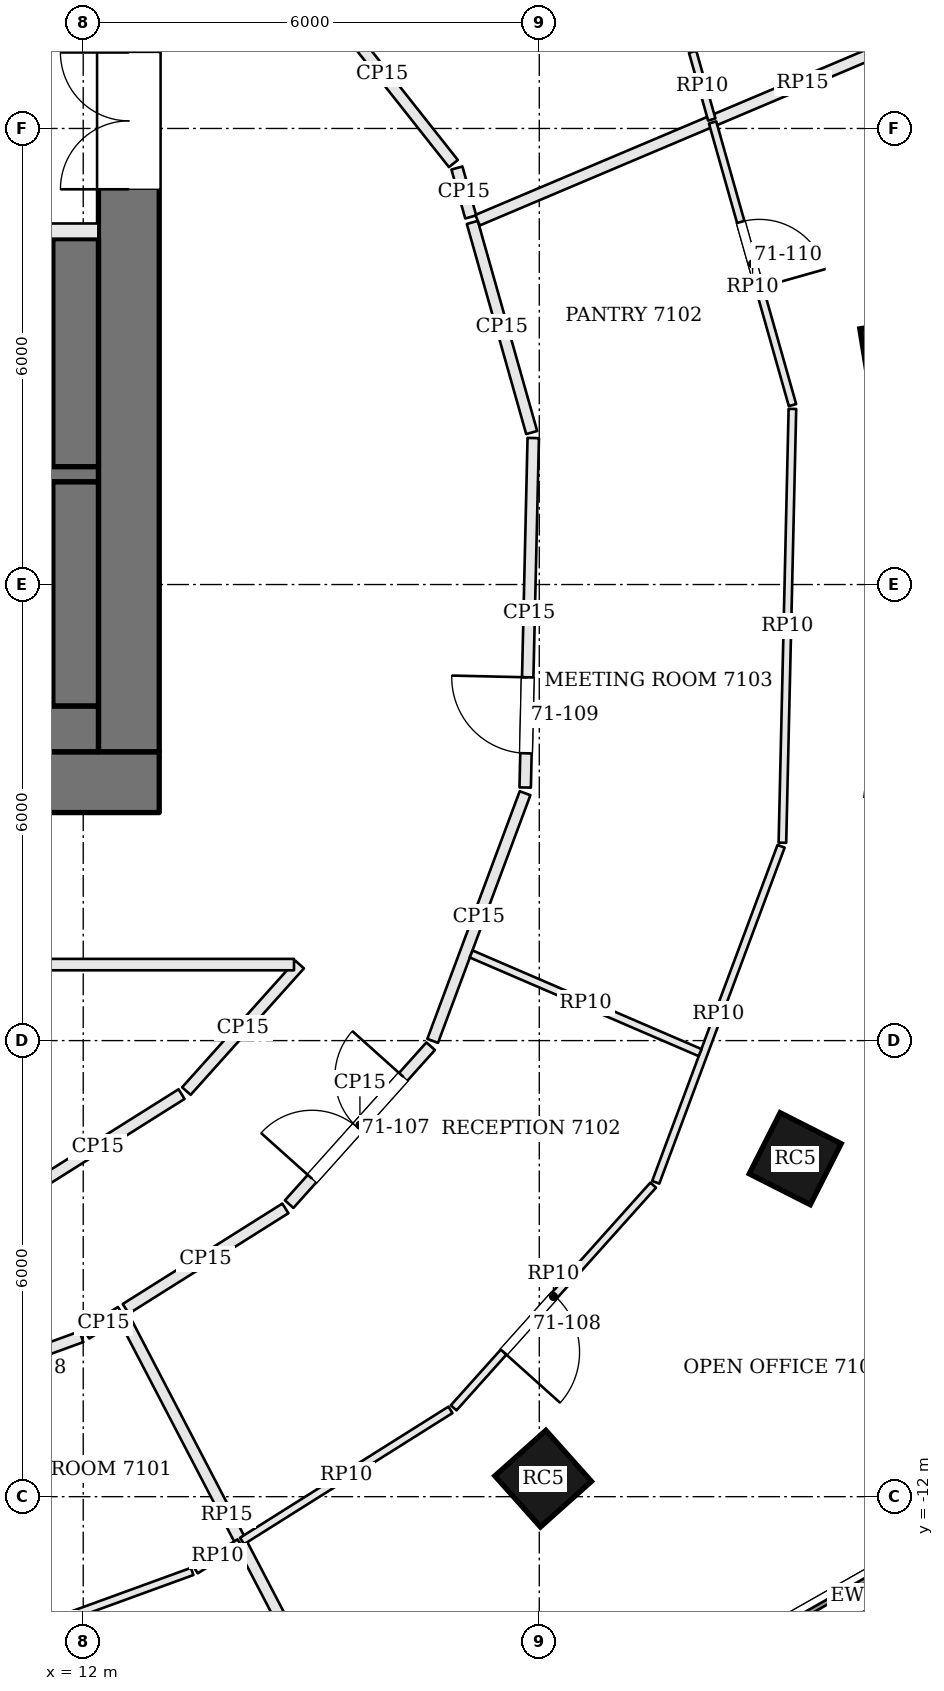
"""IFC4 building model, lengths in metres.
Left out: names, types, materials, properties, quantities, classifications, styles, units other than length and angle.
Written with IfcOpenShell. Run it as: python <this file> out.ifc"""

import sys

from ifc_helpers import new_model, si_unit, direction, frame, frame_2d, origin, origin_2d, place, context, subcontext, project, spatial, rectangle, extrude, element, fill, save


model = new_model("IFC4")
c1 = context("Model", 3, precision=1e-05, world=origin(), true_north=direction((0.0, 1.0)))
c2 = subcontext(c1, "Body", "Model", "MODEL_VIEW")
j1 = project(units=[si_unit("LENGTHUNIT", "METRE"), si_unit("PLANEANGLEUNIT", "RADIAN")], contexts=[c1])
p1 = place(None, origin())
s1 = spatial("IfcSite", under=j1, at=p1, CompositionType="ELEMENT")
p2 = place(p1, origin())
s2 = spatial("IfcBuilding", under=s1, at=p2, CompositionType="ELEMENT")
p3 = place(p2, frame((0.0, 0.0, 288.3)))
s3 = spatial("IfcBuildingStorey", under=s2, at=p3, CompositionType="ELEMENT", Elevation=288.3)
p4 = place(p3, frame((-13.0, -2.6, 0.0), z_axis=(0.0, 0.0, 1.0), x_axis=(1.0, 0.0, 0.0)))
e1 = element("IfcWall", 1, at=p4, inside=s3, PredefinedType="SHEAR", context=c2, shape_type="SweptSolid", body=[
    extrude(rectangle(XDim=26.0, YDim=0.8, at=frame_2d((13.0, 0.0))), origin(), (0.0, 0.0, 1.0), 3.9),
])
p5 = place(p4, frame((9.275, 0.0, 0.0)))
e2 = element("IfcOpeningElement", 2, at=p5, cuts=e1, PredefinedType="OPENING", context=c2, shape_type="SweptSolid", body=[
    extrude(rectangle(XDim=0.9, YDim=2.1, at=frame_2d((0.45, 1.05))), frame((0.0, 0.41, 0.0), z_axis=(0.0, -1.0, 0.0), x_axis=(1.0, 0.0, 0.0)), (0.0, 0.0, 1.0), 0.82),
])
p6 = place(p4, frame((11.75, 0.0, 0.0)))
e3 = element("IfcOpeningElement", 3, at=p6, cuts=e1, PredefinedType="OPENING", context=c2, shape_type="SweptSolid", body=[
    extrude(rectangle(XDim=1.0, YDim=2.1, at=frame_2d((0.5, 1.05))), frame((0.0, 0.41, 0.0), z_axis=(0.0, -1.0, 0.0), x_axis=(1.0, 0.0, 0.0)), (0.0, 0.0, 1.0), 0.82),
])
p7 = place(p4, frame((14.325, 0.0, 0.0)))
e4 = element("IfcOpeningElement", 4, at=p7, cuts=e1, PredefinedType="OPENING", context=c2, shape_type="SweptSolid", body=[
    extrude(rectangle(XDim=0.9, YDim=2.1, at=frame_2d((0.45, 1.05))), frame((0.0, 0.41, 0.0), z_axis=(0.0, -1.0, 0.0), x_axis=(1.0, 0.0, 0.0)), (0.0, 0.0, 1.0), 0.82),
])
p8 = place(p4, frame((16.7, 0.0, 0.0)))
e5 = element("IfcOpeningElement", 5, at=p8, cuts=e1, PredefinedType="OPENING", context=c2, shape_type="SweptSolid", body=[
    extrude(rectangle(XDim=0.9, YDim=2.1, at=frame_2d((0.45, 1.05))), frame((0.0, 0.41, 0.0), z_axis=(0.0, -1.0, 0.0), x_axis=(1.0, 0.0, 0.0)), (0.0, 0.0, 1.0), 0.82),
])
p9 = place(p3, frame((12.6, -2.2, 0.0), z_axis=(0.0, 0.0, 1.0), x_axis=(0.0, 1.0, 0.0)))
e6 = element("IfcWall", 6, at=p9, inside=s3, PredefinedType="SHEAR", context=c2, shape_type="SweptSolid", body=[
    extrude(rectangle(XDim=13.4, YDim=0.8, at=frame_2d((6.7, 0.0))), origin(), (0.0, 0.0, 1.0), 3.9),
])
p10 = place(p9, frame((7.4, 0.0, 0.0)))
e7 = element("IfcOpeningElement", 7, at=p10, cuts=e6, PredefinedType="OPENING", context=c2, shape_type="SweptSolid", body=[
    extrude(rectangle(XDim=1.8, YDim=2.1, at=frame_2d((0.9, 1.05))), frame((0.0, 0.41, 0.0), z_axis=(0.0, -1.0, 0.0), x_axis=(1.0, 0.0, 0.0)), (0.0, 0.0, 1.0), 0.82),
])
for number, where, z_axis, x_axis in (
    (8, (22.734, 2.993, 0.0), (0.0, 0.0, 1.0), (-0.162, 0.987, 0.0)),
    (9, (18.051, -11.763, 0.0), (0.0, 0.0, 1.0), (0.746, 0.666, 0.0)),
    (10, (21.367, -7.554, 0.0), (0.0, 0.0, 1.0), (0.452, 0.892, 0.0)),
):
    element("IfcColumn", number, at=place(p3, frame(where, z_axis=z_axis, x_axis=x_axis)), inside=s3, PredefinedType="COLUMN", context=c2, shape_type="SweptSolid", body=[
        extrude(rectangle(XDim=0.9, YDim=0.9, at=origin_2d()), origin(), (0.0, 0.0, 1.0), 3.9),
    ])
p11 = place(p3, frame((20.115, -14.455, 0.0), z_axis=(0.0, 0.0, 1.0), x_axis=(0.869822679286, 0.493364476427, 0.0)))
e11 = element("IfcWall", 11, at=p11, inside=s3, PredefinedType="SOLIDWALL", context=c2, shape_type="SweptSolid", body=[
    extrude(rectangle(XDim=4.638, YDim=0.45, at=frame_2d((2.319, 0.0))), origin(), (0.0, 0.0, 1.0), 3.7),
])
p12 = place(p11, frame((1.269, 0.0, 0.9)))
e12 = element("IfcOpeningElement", 12, at=p12, cuts=e11, PredefinedType="OPENING", context=c2, shape_type="SweptSolid", body=[
    extrude(rectangle(XDim=2.1, YDim=2.3, at=frame_2d((1.05, 1.15))), frame((0.0, 0.235, 0.0), z_axis=(0.0, -1.0, 0.0), x_axis=(1.0, 0.0, 0.0)), (0.0, 0.0, 1.0), 0.47),
])
p13 = place(p3, frame((12.2, 4.65, 0.0), z_axis=(0.0, 0.0, 1.0), x_axis=(-1.0, 0.0, 0.0)))
e13 = element("IfcWall", 13, at=p13, inside=s3, PredefinedType="SOLIDWALL", context=c2, shape_type="SweptSolid", body=[
    extrude(rectangle(XDim=7.1, YDim=0.2, at=frame_2d((3.55, 0.0))), origin(), (0.0, 0.0, 1.0), 3.7),
])
p14 = place(p13, frame((4.4, 0.0, 0.0)))
e14 = element("IfcOpeningElement", 14, at=p14, cuts=e13, PredefinedType="OPENING", context=c2, shape_type="SweptSolid", body=[
    extrude(rectangle(XDim=1.2, YDim=2.1, at=frame_2d((0.6, 1.05))), frame((0.0, 0.11, 0.0), z_axis=(0.0, -1.0, 0.0), x_axis=(1.0, 0.0, 0.0)), (0.0, 0.0, 1.0), 0.22),
])
p15 = place(p13, frame((1.1, 0.0, 0.0)))
e15 = element("IfcOpeningElement", 15, at=p15, cuts=e13, PredefinedType="OPENING", context=c2, shape_type="SweptSolid", body=[
    extrude(rectangle(XDim=1.2, YDim=2.1, at=frame_2d((0.6, 1.05))), frame((0.0, 0.11, 0.0), z_axis=(0.0, -1.0, 0.0), x_axis=(1.0, 0.0, 0.0)), (0.0, 0.0, 1.0), 0.22),
])
p16 = place(p3, frame((12.2, 1.475, 0.0), z_axis=(0.0, 0.0, 1.0), x_axis=(-1.0, 0.0, 0.0)))
e16 = element("IfcWall", 16, at=p16, inside=s3, PredefinedType="SOLIDWALL", context=c2, shape_type="SweptSolid", body=[
    extrude(rectangle(XDim=7.1, YDim=0.25, at=frame_2d((3.55, 0.0))), origin(), (0.0, 0.0, 1.0), 3.7),
])
p17 = place(p16, frame((5.8, 0.0, 0.0)))
e17 = element("IfcOpeningElement", 17, at=p17, cuts=e16, PredefinedType="OPENING", context=c2, shape_type="SweptSolid", body=[
    extrude(rectangle(XDim=1.2, YDim=2.1, at=frame_2d((0.6, 1.05))), frame((0.0, 0.135, 0.0), z_axis=(0.0, -1.0, 0.0), x_axis=(1.0, 0.0, 0.0)), (0.0, 0.0, 1.0), 0.27),
])
p18 = place(p3, frame((11.9, 4.55, 0.0), z_axis=(0.0, 0.0, 1.0), x_axis=(0.0, -1.0, 0.0)))
e18 = element("IfcWall", 18, at=p18, inside=s3, PredefinedType="SOLIDWALL", context=c2, shape_type="SweptSolid", body=[
    extrude(rectangle(XDim=3.0, YDim=0.6, at=frame_2d((1.5, 0.0))), origin(), (0.0, 0.0, 1.0), 3.7),
])
p19 = place(p3, frame((11.9, 1.35, 0.0), z_axis=(0.0, 0.0, 1.0), x_axis=(0.0, -1.0, 0.0)))
e19 = element("IfcWall", 19, at=p19, inside=s3, PredefinedType="SOLIDWALL", context=c2, shape_type="SweptSolid", body=[
    extrude(rectangle(XDim=2.95, YDim=0.6, at=frame_2d((1.475, 0.0))), origin(), (0.0, 0.0, 1.0), 3.7),
])
p20 = place(p3, frame((12.2, -1.9, 0.0), z_axis=(0.0, 0.0, 1.0), x_axis=(-1.0, 0.0, 0.0)))
e20 = element("IfcWall", 20, at=p20, inside=s3, PredefinedType="SOLIDWALL", context=c2, shape_type="SweptSolid", body=[
    extrude(rectangle(XDim=7.1, YDim=0.6, at=frame_2d((3.55, 0.0))), origin(), (0.0, 0.0, 1.0), 3.7),
])
p21 = place(p3, frame((8.86, -11.03, 0.0), z_axis=(0.0, 0.0, 1.0), x_axis=(0.939685902536, 0.342038601001, 0.0)))
e21 = element("IfcWall", 21, at=p21, inside=s3, PredefinedType="PARTITIONING", context=c2, shape_type="SweptSolid", body=[
    extrude(rectangle(XDim=3.316, YDim=0.15, at=frame_2d((1.658, 0.0))), origin(), (0.0, 0.0, 1.0), 3.198),
])
p22 = place(p21, frame((1.65, 0.0, 0.0)))
e22 = element("IfcOpeningElement", 22, at=p22, cuts=e21, PredefinedType="OPENING", context=c2, shape_type="SweptSolid", body=[
    extrude(rectangle(XDim=0.9, YDim=2.1, at=frame_2d((0.45, 1.05))), frame((0.0, 0.085, 0.0), z_axis=(0.0, -1.0, 0.0), x_axis=(1.0, 0.0, 0.0)), (0.0, 0.0, 1.0), 0.17),
])
p23 = place(p3, frame((12.04, -9.856, 0.0), z_axis=(0.0, 0.0, 1.0), x_axis=(0.846240393033, 0.532801273647, 0.0)))
e23 = element("IfcWall", 23, at=p23, inside=s3, PredefinedType="PARTITIONING", context=c2, shape_type="SweptSolid", body=[
    extrude(rectangle(XDim=0.54, YDim=0.15, at=frame_2d((0.27, 0.0))), origin(), (0.0, 0.0, 1.0), 3.198),
])
p24 = place(p3, frame((15.244, -14.841, 0.0), z_axis=(0.0, 0.0, 1.0), x_axis=(-0.462122511499, 0.886816093881, 0.0)))
e24 = element("IfcWall", 24, at=p24, inside=s3, PredefinedType="PARTITIONING", context=c2, shape_type="SweptSolid", body=[
    extrude(rectangle(XDim=5.871, YDim=0.15, at=frame_2d((2.935, 0.0))), origin(), (0.0, 0.0, 1.0), 3.234),
])
p25 = place(p3, frame((12.56, -9.529, 0.0), z_axis=(0.0, 0.0, 1.0), x_axis=(0.846402081662, 0.53254437952, 0.0)))
e25 = element("IfcWall", 25, at=p25, inside=s3, PredefinedType="PARTITIONING", context=c2, shape_type="SweptSolid", body=[
    extrude(rectangle(XDim=2.481, YDim=0.15, at=frame_2d((1.24, 0.0))), origin(), (0.0, 0.0, 1.0), 3.198),
])
p26 = place(p3, frame((14.709, -8.152, 0.0), z_axis=(0.0, 0.0, 1.0), x_axis=(0.667275630306, 0.744810870758, 0.0)))
e26 = element("IfcWall", 26, at=p26, inside=s3, PredefinedType="PARTITIONING", context=c2, shape_type="SweptSolid", body=[
    extrude(rectangle(XDim=2.79, YDim=0.15, at=frame_2d((1.395, 0.0))), origin(), (0.0, 0.0, 1.0), 3.198),
])
p27 = place(p26, frame((0.45, 0.0, 0.0)))
e27 = element("IfcOpeningElement", 27, at=p27, cuts=e26, PredefinedType="OPENING", context=c2, shape_type="SweptSolid", body=[
    extrude(rectangle(XDim=1.8, YDim=2.1, at=frame_2d((0.9, 1.05))), frame((0.0, 0.085, 0.0), z_axis=(0.0, -1.0, 0.0), x_axis=(1.0, 0.0, 0.0)), (0.0, 0.0, 1.0), 0.17),
])
p28 = place(p3, frame((16.597, -6.003, 0.0), z_axis=(0.0, 0.0, 1.0), x_axis=(0.349499455299, 0.936936567088, 0.0)))
e28 = element("IfcWall", 28, at=p28, inside=s3, PredefinedType="PARTITIONING", context=c2, shape_type="SweptSolid", body=[
    extrude(rectangle(XDim=3.477, YDim=0.15, at=frame_2d((1.739, 0.0))), origin(), (0.0, 0.0, 1.0), 3.198),
])
p29 = place(p3, frame((17.814, -2.67, 0.0), z_axis=(0.0, 0.0, 1.0), x_axis=(0.023038539091, 0.999734577634, 0.0)))
e29 = element("IfcWall", 29, at=p29, inside=s3, PredefinedType="PARTITIONING", context=c2, shape_type="SweptSolid", body=[
    extrude(rectangle(XDim=4.599, YDim=0.15, at=frame_2d((2.3, 0.0))), origin(), (0.0, 0.0, 1.0), 3.198),
])
p30 = place(p29, frame((0.45, 0.0, 0.0)))
e30 = element("IfcOpeningElement", 30, at=p30, cuts=e29, PredefinedType="OPENING", context=c2, shape_type="SweptSolid", body=[
    extrude(rectangle(XDim=1.0, YDim=2.4, at=frame_2d((0.5, 1.2))), frame((0.0, 0.085, 0.0), z_axis=(0.0, -1.0, 0.0), x_axis=(1.0, 0.0, 0.0)), (0.0, 0.0, 1.0), 0.17),
])
p31 = place(p3, frame((17.9, 2.0, 0.0), z_axis=(0.0, 0.0, 1.0), x_axis=(-0.271980959701, 0.962302633042, 0.0)))
e31 = element("IfcWall", 31, at=p31, inside=s3, PredefinedType="PARTITIONING", context=c2, shape_type="SweptSolid", body=[
    extrude(rectangle(XDim=2.873, YDim=0.15, at=frame_2d((1.436, 0.0))), origin(), (0.0, 0.0, 1.0), 3.198),
])
p32 = place(p3, frame((25.739, 8.408, 0.0), z_axis=(0.0, 0.0, 1.0), x_axis=(-0.92106014218, -0.389420357052, 0.0)))
e32 = element("IfcWall", 32, at=p32, inside=s3, PredefinedType="PARTITIONING", context=c2, shape_type="SweptSolid", body=[
    extrude(rectangle(XDim=9.284, YDim=0.15, at=frame_2d((4.642, 0.0))), origin(), (0.0, 0.0, 1.0), 3.234),
])
p33 = place(p3, frame((17.098, 4.836, 0.0), z_axis=(0.0, 0.0, 1.0), x_axis=(-0.271971703561, 0.962305249109, 0.0)))
e33 = element("IfcWall", 33, at=p33, inside=s3, PredefinedType="PARTITIONING", context=c2, shape_type="SweptSolid", body=[
    extrude(rectangle(XDim=0.669, YDim=0.15, at=frame_2d((0.334, 0.0))), origin(), (0.0, 0.0, 1.0), 3.198),
])
p34 = place(p3, frame((16.87, 5.539, 0.0), z_axis=(0.0, 0.0, 1.0), x_axis=(-0.620093074114, 0.784528252796, 0.0)))
e34 = element("IfcWall", 34, at=p34, inside=s3, PredefinedType="PARTITIONING", context=c2, shape_type="SweptSolid", body=[
    extrude(rectangle(XDim=3.015, YDim=0.15, at=frame_2d((1.508, 0.0))), origin(), (0.0, 0.0, 1.0), 3.198),
])
p35 = place(p3, frame((14.848, -5.0, 0.0), z_axis=(0.0, 0.0, 1.0), x_axis=(-0.667363249373, -0.744732363595, 0.0)))
e35 = element("IfcWall", 35, at=p35, inside=s3, PredefinedType="PARTITIONING", context=c2, shape_type="SweptSolid", body=[
    extrude(rectangle(XDim=2.234, YDim=0.15, at=frame_2d((1.117, 0.0))), origin(), (0.0, 0.0, 1.0), 3.198),
])
p36 = place(p3, frame((13.293, -6.704, 0.0), z_axis=(0.0, 0.0, 1.0), x_axis=(-0.84641299998, -0.532527026041, 0.0)))
e36 = element("IfcWall", 36, at=p36, inside=s3, PredefinedType="PARTITIONING", context=c2, shape_type="SweptSolid", body=[
    extrude(rectangle(XDim=2.602, YDim=0.15, at=frame_2d((1.301, 0.0))), origin(), (0.0, 0.0, 1.0), 3.198),
])
p37 = place(p3, frame((-14.789, -5.0, 0.0), z_axis=(0.0, 0.0, 1.0), x_axis=(1.0, 0.0, 0.0)))
e37 = element("IfcWall", 37, at=p37, inside=s3, PredefinedType="PARTITIONING", context=c2, shape_type="SweptSolid", body=[
    extrude(rectangle(XDim=29.562, YDim=0.15, at=frame_2d((14.781, 0.0))), origin(), (0.0, 0.0, 1.0), 3.198),
])
p38 = place(p37, frame((3.857, 0.0, 0.0)))
e38 = element("IfcOpeningElement", 38, at=p38, cuts=e37, PredefinedType="OPENING", context=c2, shape_type="SweptSolid", body=[
    extrude(rectangle(XDim=1.0, YDim=2.4, at=frame_2d((0.5, 1.2))), frame((0.0, 0.085, 0.0), z_axis=(0.0, -1.0, 0.0), x_axis=(1.0, 0.0, 0.0)), (0.0, 0.0, 1.0), 0.17),
])
p39 = place(p37, frame((14.289, 0.0, 0.0)))
e39 = element("IfcOpeningElement", 39, at=p39, cuts=e37, PredefinedType="OPENING", context=c2, shape_type="SweptSolid", body=[
    extrude(rectangle(XDim=1.0, YDim=2.1, at=frame_2d((0.5, 1.05))), frame((0.0, 0.085, 0.0), z_axis=(0.0, -1.0, 0.0), x_axis=(1.0, 0.0, 0.0)), (0.0, 0.0, 1.0), 0.17),
])
p40 = place(p37, frame((24.713, 0.0, 0.0)))
e40 = element("IfcOpeningElement", 40, at=p40, cuts=e37, PredefinedType="OPENING", context=c2, shape_type="SweptSolid", body=[
    extrude(rectangle(XDim=1.0, YDim=2.4, at=frame_2d((0.5, 1.2))), frame((0.0, 0.085, 0.0), z_axis=(0.0, -1.0, 0.0), x_axis=(1.0, 0.0, 0.0)), (0.0, 0.0, 1.0), 0.17),
])
p41 = place(p3, frame((14.056, -12.604, 0.0), z_axis=(0.0, 0.0, 1.0), x_axis=(-0.846544184051, -0.532318461496, 0.0)))
e41 = element("IfcWall", 41, at=p41, inside=s3, PredefinedType="PARTITIONING", context=c2, shape_type="SweptSolid", body=[
    extrude(rectangle(XDim=0.681, YDim=0.1, at=frame_2d((0.34, 0.0))), origin(), (0.0, 0.0, 1.0), 3.198),
])
p42 = place(p3, frame((13.433, -12.984, 0.0), z_axis=(0.0, 0.0, 1.0), x_axis=(-0.939673979614, -0.342071355182, 0.0)))
e42 = element("IfcWall", 42, at=p42, inside=s3, PredefinedType="PARTITIONING", context=c2, shape_type="SweptSolid", body=[
    extrude(rectangle(XDim=4.0, YDim=0.1, at=frame_2d((2.0, 0.0))), origin(), (0.0, 0.0, 1.0), 3.198),
])
p43 = place(p42, frame((2.85, 0.0, 0.0)))
e43 = element("IfcOpeningElement", 43, at=p43, cuts=e42, PredefinedType="OPENING", context=c2, shape_type="SweptSolid", body=[
    extrude(rectangle(XDim=0.9, YDim=2.1, at=frame_2d((0.45, 1.05))), frame((0.0, 0.06, 0.0), z_axis=(0.0, -1.0, 0.0), x_axis=(1.0, 0.0, 0.0)), (0.0, 0.0, 1.0), 0.12),
])
p44 = place(p3, frame((20.28, 6.079, 0.0), z_axis=(0.0, 0.0, 1.0), x_axis=(0.271974810721, -0.962304370942, 0.0)))
e44 = element("IfcWall", 44, at=p44, inside=s3, PredefinedType="PARTITIONING", context=c2, shape_type="SweptSolid", body=[
    extrude(rectangle(XDim=3.865, YDim=0.1, at=frame_2d((1.932, 0.0))), origin(), (0.0, 0.0, 1.0), 3.198),
])
p45 = place(p44, frame((1.36, 0.0, 0.0)))
e45 = element("IfcOpeningElement", 45, at=p45, cuts=e44, PredefinedType="OPENING", context=c2, shape_type="SweptSolid", body=[
    extrude(rectangle(XDim=0.9, YDim=2.1, at=frame_2d((0.45, 1.05))), frame((0.0, 0.06, 0.0), z_axis=(0.0, -1.0, 0.0), x_axis=(1.0, 0.0, 0.0)), (0.0, 0.0, 1.0), 0.12),
])
p46 = place(p3, frame((21.33, 2.31, 0.0), z_axis=(0.0, 0.0, 1.0), x_axis=(-0.023052695677, -0.9997342513, 0.0)))
e46 = element("IfcWall", 46, at=p46, inside=s3, PredefinedType="PARTITIONING", context=c2, shape_type="SweptSolid", body=[
    extrude(rectangle(XDim=5.708, YDim=0.1, at=frame_2d((2.854, 0.0))), origin(), (0.0, 0.0, 1.0), 3.198),
])
p47 = place(p3, frame((21.181, -3.443, 0.0), z_axis=(0.0, 0.0, 1.0), x_axis=(-0.349438657616, -0.936959243811, 0.0)))
e47 = element("IfcWall", 47, at=p47, inside=s3, PredefinedType="PARTITIONING", context=c2, shape_type="SweptSolid", body=[
    extrude(rectangle(XDim=4.718, YDim=0.1, at=frame_2d((2.359, 0.0))), origin(), (0.0, 0.0, 1.0), 3.198),
])
p48 = place(p3, frame((19.499, -7.901, 0.0), z_axis=(0.0, 0.0, 1.0), x_axis=(-0.667320762971, -0.744770433964, 0.0)))
e48 = element("IfcWall", 48, at=p48, inside=s3, PredefinedType="PARTITIONING", context=c2, shape_type="SweptSolid", body=[
    extrude(rectangle(XDim=3.934, YDim=0.1, at=frame_2d((1.967, 0.0))), origin(), (0.0, 0.0, 1.0), 3.198),
])
p49 = place(p48, frame((1.95, 0.0, 0.0)))
e49 = element("IfcOpeningElement", 49, at=p49, cuts=e48, PredefinedType="OPENING", context=c2, shape_type="SweptSolid", body=[
    extrude(rectangle(XDim=1.0, YDim=2.1, at=frame_2d((0.5, 1.05))), frame((0.0, 0.06, 0.0), z_axis=(0.0, -1.0, 0.0), x_axis=(1.0, 0.0, 0.0)), (0.0, 0.0, 1.0), 0.12),
])
p50 = place(p3, frame((16.831, -10.858, 0.0), z_axis=(0.0, 0.0, 1.0), x_axis=(-0.846427876971, -0.532503379413, 0.0)))
e50 = element("IfcWall", 50, at=p50, inside=s3, PredefinedType="PARTITIONING", context=c2, shape_type="SweptSolid", body=[
    extrude(rectangle(XDim=3.239, YDim=0.1, at=frame_2d((1.62, 0.0))), origin(), (0.0, 0.0, 1.0), 3.198),
])
p51 = place(p3, frame((17.104, -4.86, 0.0), z_axis=(0.0, 0.0, 1.0), x_axis=(0.918346015078, -0.395778469084, 0.0)))
e51 = element("IfcWall", 51, at=p51, inside=s3, PredefinedType="PARTITIONING", context=c2, shape_type="SweptSolid", body=[
    extrude(rectangle(XDim=3.279, YDim=0.1, at=frame_2d((1.64, 0.0))), origin(), (0.0, 0.0, 1.0), 3.198),
])
p52 = place(p3, frame((20.018, 7.008, 0.0), z_axis=(0.0, 0.0, 1.0), x_axis=(0.272036681058, -0.962286882462, 0.0)))
e52 = element("IfcWall", 52, at=p52, inside=s3, PredefinedType="PARTITIONING", context=c2, shape_type="SweptSolid", body=[
    extrude(rectangle(XDim=0.925, YDim=0.1, at=frame_2d((0.463, 0.0))), origin(), (0.0, 0.0, 1.0), 3.198),
])
p53 = place(p12, origin())
e53 = element("IfcWindow", 53, at=p53, inside=s3, PartitioningType="SINGLE_PANEL", PredefinedType="WINDOW", context=c2, shape_type="SweptSolid", body=[
    extrude(rectangle(XDim=2.1, YDim=2.3, at=frame_2d((1.05, 1.15))), frame((0.0, 0.135, 0.0), z_axis=(0.0, -1.0, 0.0), x_axis=(1.0, 0.0, 0.0)), (0.0, 0.0, 1.0), 0.06),
])
fill(e12, e53)
p54 = place(p10, origin())
e54 = element("IfcDoor", 54, at=p54, inside=s3, OperationType="DOUBLE_DOOR_SINGLE_SWING", PredefinedType="DOOR", context=c2, shape_type="SweptSolid", body=[
    extrude(rectangle(XDim=1.8, YDim=2.1, at=frame_2d((0.9, 1.05))), frame((0.0, 0.025, 0.0), z_axis=(0.0, -1.0, 0.0), x_axis=(1.0, 0.0, 0.0)), (0.0, 0.0, 1.0), 0.05),
])
fill(e7, e54)
p55 = place(p27, origin())
e55 = element("IfcDoor", 55, at=p55, inside=s3, OperationType="DOUBLE_DOOR_SINGLE_SWING", PredefinedType="DOOR", context=c2, shape_type="SweptSolid", body=[
    extrude(rectangle(XDim=1.8, YDim=2.1, at=frame_2d((0.9, 1.05))), frame((0.0, 0.025, 0.0), z_axis=(0.0, -1.0, 0.0), x_axis=(1.0, 0.0, 0.0)), (0.0, 0.0, 1.0), 0.05),
])
fill(e27, e55)
p56 = place(p49, origin())
e56 = element("IfcDoor", 56, at=p56, inside=s3, OperationType="SINGLE_SWING_RIGHT", PredefinedType="DOOR", context=c2, shape_type="SweptSolid", body=[
    extrude(rectangle(XDim=1.0, YDim=2.1, at=frame_2d((0.5, 1.05))), frame((0.0, 0.025, 0.0), z_axis=(0.0, -1.0, 0.0), x_axis=(1.0, 0.0, 0.0)), (0.0, 0.0, 1.0), 0.05),
])
fill(e49, e56)
p57 = place(p30, origin())
e57 = element("IfcDoor", 57, at=p57, inside=s3, OperationType="SINGLE_SWING_RIGHT", PredefinedType="DOOR", context=c2, shape_type="SweptSolid", body=[
    extrude(rectangle(XDim=1.0, YDim=2.4, at=frame_2d((0.5, 1.2))), frame((0.0, 0.025, 0.0), z_axis=(0.0, -1.0, 0.0), x_axis=(1.0, 0.0, 0.0)), (0.0, 0.0, 1.0), 0.05),
])
fill(e30, e57)
p58 = place(p45, origin())
e58 = element("IfcDoor", 58, at=p58, inside=s3, OperationType="SINGLE_SWING_RIGHT", PredefinedType="DOOR", context=c2, shape_type="SweptSolid", body=[
    extrude(rectangle(XDim=0.9, YDim=2.1, at=frame_2d((0.45, 1.05))), frame((0.0, 0.025, 0.0), z_axis=(0.0, -1.0, 0.0), x_axis=(1.0, 0.0, 0.0)), (0.0, 0.0, 1.0), 0.05),
])
fill(e45, e58)
save(model, sys.argv[1])
